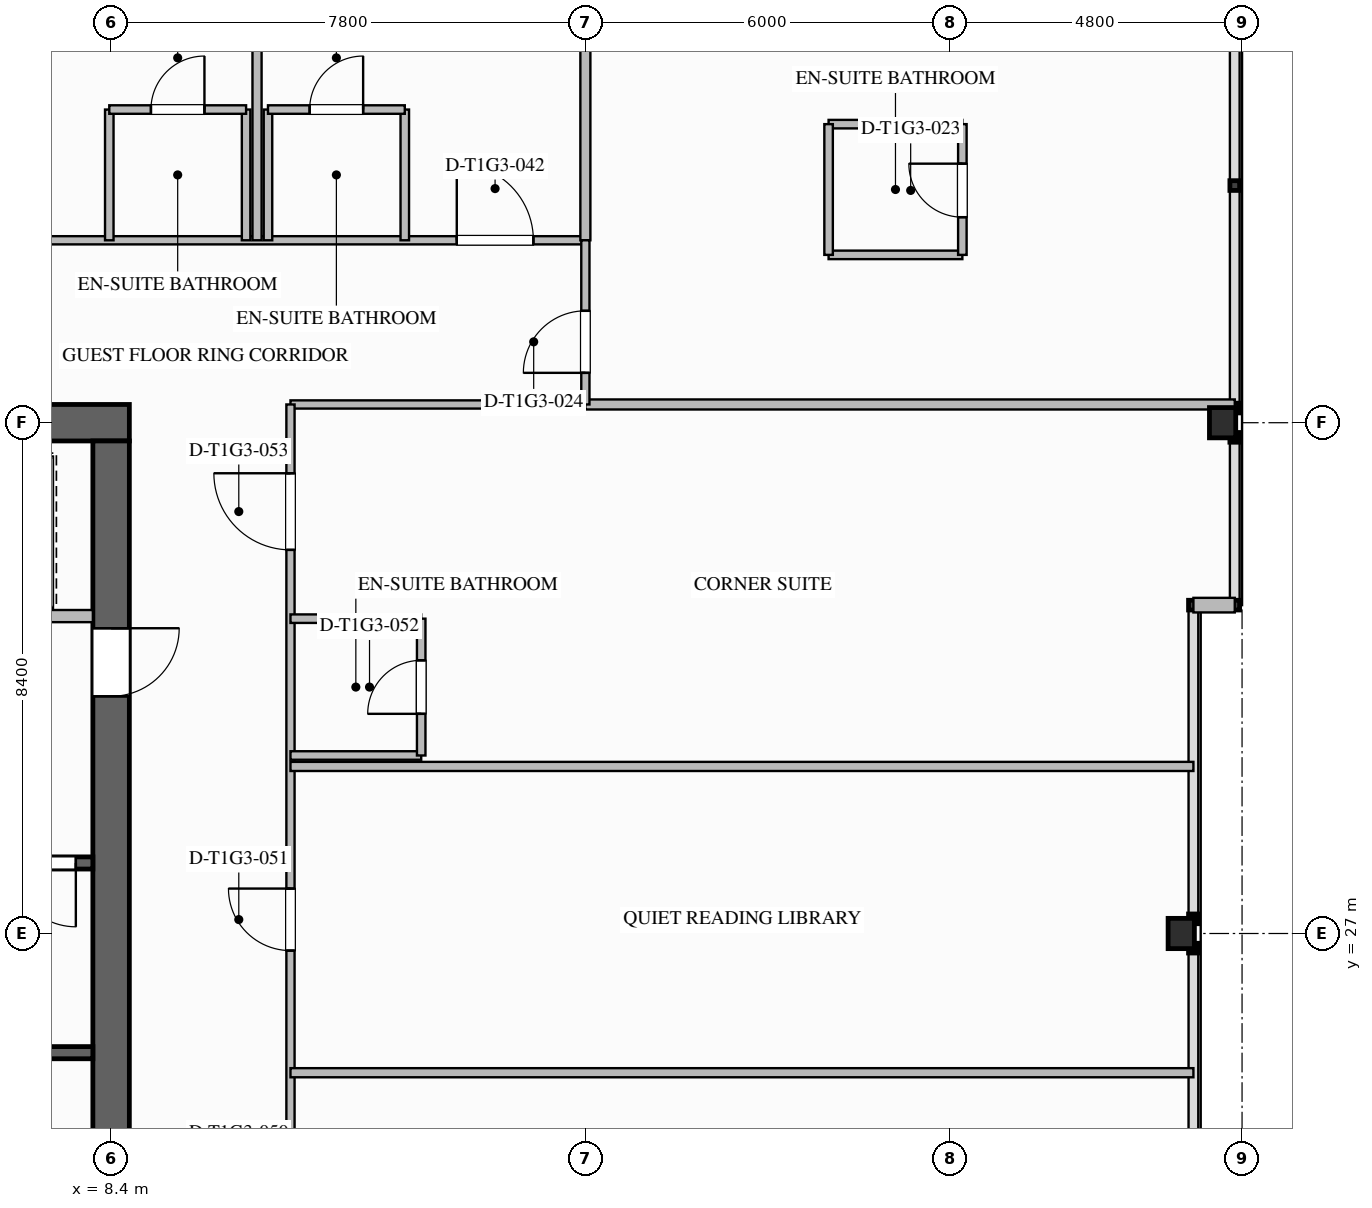
"""IFC4 building model, lengths in metres.
Left out: names, types, materials, properties, quantities, classifications, styles, units other than length and angle.
Written with IfcOpenShell. Run it as: python <this file> out.ifc"""

import sys

from ifc_helpers import new_model, si_unit, direction, frame, frame_2d, origin, origin_2d, place, context, subcontext, project, spatial, rectangle, i_section, extrude, element, fill, save


model = new_model("IFC4")
c1 = context("Model", 3, precision=1e-05, world=origin(), true_north=direction((0.0, 1.0)))
c2 = subcontext(c1, "Body", "Model", "MODEL_VIEW")
j1 = project(units=[si_unit("LENGTHUNIT", "METRE"), si_unit("PLANEANGLEUNIT", "RADIAN")], contexts=[c1])
p1 = place(None, origin())
s1 = spatial("IfcSite", under=j1, at=p1, CompositionType="ELEMENT")
p2 = place(p1, origin())
s2 = spatial("IfcBuilding", under=s1, at=p2, CompositionType="ELEMENT")
p3 = place(p2, frame((0.0, 0.0, 54.2)))
s3 = spatial("IfcBuildingStorey", under=s2, at=p3, CompositionType="ELEMENT", Elevation=54.2)
p4 = place(p3, frame((-8.7, 35.4, 0.0), z_axis=(0.0, 0.0, 1.0), x_axis=(1.0, 0.0, 0.0)))
e1 = element("IfcWall", 1, at=p4, inside=s3, PredefinedType="SHEAR", context=c2, shape_type="SweptSolid", body=[
    extrude(rectangle(XDim=17.4, YDim=0.6, at=frame_2d((8.7, 0.0))), origin(), (0.0, 0.0, 1.0), 3.5),
])
p5 = place(p3, frame((8.4, 35.1, 0.0), z_axis=(0.0, 0.0, 1.0), x_axis=(0.0, -1.0, 0.0)))
e2 = element("IfcWall", 2, at=p5, inside=s3, PredefinedType="SHEAR", context=c2, shape_type="SweptSolid", body=[
    extrude(rectangle(XDim=16.2, YDim=0.6, at=frame_2d((8.1, 0.0))), origin(), (0.0, 0.0, 1.0), 3.5),
])
p6 = place(p5, frame((3.08, 0.0, 0.0)))
e3 = element("IfcOpeningElement", 3, at=p6, cuts=e2, PredefinedType="OPENING", context=c2, shape_type="SweptSolid", body=[
    extrude(rectangle(XDim=1.12, YDim=2.1, at=frame_2d((0.56, 1.05))), frame((0.0, 0.31, 0.0), z_axis=(0.0, -1.0, 0.0), x_axis=(1.0, 0.0, 0.0)), (0.0, 0.0, 1.0), 0.62),
])
for number, where, z_axis, x_axis in (
    (4, (26.0, 27.0, 0.0), (0.0, 0.0, 1.0), (1.0, 0.0, 0.0)),
    (5, (26.68, 35.4, 0.0), (0.0, 0.0, 1.0), (1.0, 0.0, 0.0)),
):
    element("IfcColumn", number, at=place(p3, frame(where, z_axis=z_axis, x_axis=x_axis)), inside=s3, PredefinedType="COLUMN", context=c2, shape_type="SweptSolid", body=[
        extrude(i_section(OverallWidth=0.432, OverallDepth=0.498, WebThickness=0.056, FlangeThickness=0.089, FilletRadius=0.03, at=origin_2d()), origin(), (0.0, 0.0, 1.0), 3.497),
    ])
p7 = place(p3, frame((26.88, 32.4, 0.0), z_axis=(0.0, 0.0, 1.0), x_axis=(-1.0, 0.0, 0.0)))
e6 = element("IfcWall", 6, at=p7, inside=s3, PredefinedType="STANDARD", context=c2, shape_type="SweptSolid", body=[
    extrude(rectangle(XDim=0.68, YDim=0.24, at=frame_2d((0.34, 0.0))), origin(), (0.0, 0.0, 1.0), 3.24),
])
p8 = place(p3, frame((0.0, 25.04, 0.0), z_axis=(0.0, 0.0, 1.0), x_axis=(1.0, 0.0, 0.0)))
e7 = element("IfcWall", 7, at=p8, inside=s3, PredefinedType="SOLIDWALL", context=c2, shape_type="SweptSolid", body=[
    extrude(rectangle(XDim=8.1, YDim=0.2, at=frame_2d((4.05, 0.0))), origin(), (0.0, 0.0, 1.0), 3.24),
])
p9 = place(p3, frame((8.1, 28.16, 0.0), z_axis=(0.0, 0.0, 1.0), x_axis=(-1.0, 0.0, 0.0)))
e8 = element("IfcWall", 8, at=p9, inside=s3, PredefinedType="SOLIDWALL", context=c2, shape_type="SweptSolid", body=[
    extrude(rectangle(XDim=8.1, YDim=0.2, at=frame_2d((4.05, 0.0))), origin(), (0.0, 0.0, 1.0), 3.24),
])
p10 = place(p9, frame((0.28, 0.0, 0.0)))
e9 = element("IfcOpeningElement", 9, at=p10, cuts=e8, PredefinedType="OPENING", context=c2, shape_type="SweptSolid", body=[
    extrude(rectangle(XDim=1.05, YDim=2.1, at=frame_2d((0.525, 1.05))), frame((0.0, 0.11, 0.0), z_axis=(0.0, -1.0, 0.0), x_axis=(1.0, 0.0, 0.0)), (0.0, 0.0, 1.0), 0.22),
])
p11 = place(p3, frame((3.1, 32.22, 0.0), z_axis=(0.0, 0.0, 1.0), x_axis=(1.0, 0.0, 0.0)))
e10 = element("IfcWall", 10, at=p11, inside=s3, PredefinedType="SOLIDWALL", context=c2, shape_type="SweptSolid", body=[
    extrude(rectangle(XDim=5.0, YDim=0.2, at=frame_2d((2.5, 0.0))), origin(), (0.0, 0.0, 1.0), 3.24),
])
p12 = place(p11, frame((0.55, 0.0, 0.0)))
e11 = element("IfcOpeningElement", 11, at=p12, cuts=e10, PredefinedType="OPENING", context=c2, shape_type="SweptSolid", body=[
    extrude(rectangle(XDim=1.2, YDim=2.2, at=frame_2d((0.6, 1.1))), frame((0.0, 0.11, 0.0), z_axis=(0.0, -1.0, 0.0), x_axis=(1.0, 0.0, 0.0)), (0.0, 0.0, 1.0), 0.22),
])
p13 = place(p11, frame((2.85, 0.0, 0.0)))
e12 = element("IfcOpeningElement", 12, at=p13, cuts=e10, PredefinedType="OPENING", context=c2, shape_type="SweptSolid", body=[
    extrude(rectangle(XDim=1.2, YDim=2.2, at=frame_2d((0.6, 1.1))), frame((0.0, 0.11, 0.0), z_axis=(0.0, -1.0, 0.0), x_axis=(1.0, 0.0, 0.0)), (0.0, 0.0, 1.0), 0.22),
])
p14 = place(p3, frame((-16.2, 38.4, 0.0), z_axis=(0.0, 0.0, 1.0), x_axis=(1.0, 0.0, 0.0)))
e13 = element("IfcWall", 13, at=p14, inside=s3, PredefinedType="PARTITIONING", context=c2, shape_type="SweptSolid", body=[
    extrude(rectangle(XDim=32.4, YDim=0.135, at=frame_2d((16.2, 0.0))), origin(), (0.0, 0.0, 1.0), 3.24),
])
p15 = place(p14, frame((4.095, 0.0, 0.0)))
e14 = element("IfcOpeningElement", 14, at=p15, cuts=e13, PredefinedType="OPENING", context=c2, shape_type="SweptSolid", body=[
    extrude(rectangle(XDim=1.26, YDim=2.2, at=frame_2d((0.63, 1.1))), frame((0.0, 0.077, 0.0), z_axis=(0.0, -1.0, 0.0), x_axis=(1.0, 0.0, 0.0)), (0.0, 0.0, 1.0), 0.155),
])
p16 = place(p14, frame((7.875, 0.0, 0.0)))
e15 = element("IfcOpeningElement", 15, at=p16, cuts=e13, PredefinedType="OPENING", context=c2, shape_type="SweptSolid", body=[
    extrude(rectangle(XDim=1.26, YDim=2.2, at=frame_2d((0.63, 1.1))), frame((0.0, 0.077, 0.0), z_axis=(0.0, -1.0, 0.0), x_axis=(1.0, 0.0, 0.0)), (0.0, 0.0, 1.0), 0.155),
])
p17 = place(p14, frame((15.69, 0.0, 0.0)))
e16 = element("IfcOpeningElement", 16, at=p17, cuts=e13, PredefinedType="OPENING", context=c2, shape_type="SweptSolid", body=[
    extrude(rectangle(XDim=1.02, YDim=2.15, at=frame_2d((0.51, 1.075))), frame((0.0, 0.077, 0.0), z_axis=(0.0, -1.0, 0.0), x_axis=(1.0, 0.0, 0.0)), (0.0, 0.0, 1.0), 0.155),
])
p18 = place(p14, frame((21.645, 0.0, 0.0)))
e17 = element("IfcOpeningElement", 17, at=p18, cuts=e13, PredefinedType="OPENING", context=c2, shape_type="SweptSolid", body=[
    extrude(rectangle(XDim=1.26, YDim=2.2, at=frame_2d((0.63, 1.1))), frame((0.0, 0.077, 0.0), z_axis=(0.0, -1.0, 0.0), x_axis=(1.0, 0.0, 0.0)), (0.0, 0.0, 1.0), 0.155),
])
p19 = place(p14, frame((30.285, 0.0, 0.0)))
e18 = element("IfcOpeningElement", 18, at=p19, cuts=e13, PredefinedType="OPENING", context=c2, shape_type="SweptSolid", body=[
    extrude(rectangle(XDim=1.26, YDim=2.2, at=frame_2d((0.63, 1.1))), frame((0.0, 0.077, 0.0), z_axis=(0.0, -1.0, 0.0), x_axis=(1.0, 0.0, 0.0)), (0.0, 0.0, 1.0), 0.155),
])
p20 = place(p3, frame((11.35, 35.7, 0.0), z_axis=(0.0, 0.0, 1.0), x_axis=(1.0, 0.0, 0.0)))
e19 = element("IfcWall", 19, at=p20, inside=s3, PredefinedType="PARTITIONING", context=c2, shape_type="SweptSolid", body=[
    extrude(rectangle(XDim=4.85, YDim=0.135, at=frame_2d((2.425, 0.0))), origin(), (0.0, 0.0, 1.0), 3.24),
])
p21 = place(p3, frame((11.35, 18.3, 0.0), z_axis=(0.0, 0.0, 1.0), x_axis=(0.0, 1.0, 0.0)))
e20 = element("IfcWall", 20, at=p21, inside=s3, PredefinedType="PARTITIONING", context=c2, shape_type="SweptSolid", body=[
    extrude(rectangle(XDim=17.4, YDim=0.135, at=frame_2d((8.7, 0.0))), origin(), (0.0, 0.0, 1.0), 3.24),
])
p22 = place(p21, frame((3.79, 0.0, 0.0)))
e21 = element("IfcOpeningElement", 21, at=p22, cuts=e20, PredefinedType="OPENING", context=c2, shape_type="SweptSolid", body=[
    extrude(rectangle(XDim=1.26, YDim=2.2, at=frame_2d((0.63, 1.1))), frame((0.0, 0.077, 0.0), z_axis=(0.0, -1.0, 0.0), x_axis=(1.0, 0.0, 0.0)), (0.0, 0.0, 1.0), 0.155),
])
p23 = place(p21, frame((8.419, 0.0, 0.0)))
e22 = element("IfcOpeningElement", 22, at=p23, cuts=e20, PredefinedType="OPENING", context=c2, shape_type="SweptSolid", body=[
    extrude(rectangle(XDim=1.02, YDim=2.15, at=frame_2d((0.51, 1.075))), frame((0.0, 0.077, 0.0), z_axis=(0.0, -1.0, 0.0), x_axis=(1.0, 0.0, 0.0)), (0.0, 0.0, 1.0), 0.155),
])
p24 = place(p21, frame((15.009, 0.0, 0.0)))
e23 = element("IfcOpeningElement", 23, at=p24, cuts=e20, PredefinedType="OPENING", context=c2, shape_type="SweptSolid", body=[
    extrude(rectangle(XDim=1.26, YDim=2.2, at=frame_2d((0.63, 1.1))), frame((0.0, 0.077, 0.0), z_axis=(0.0, -1.0, 0.0), x_axis=(1.0, 0.0, 0.0)), (0.0, 0.0, 1.0), 0.155),
])
p25 = place(p3, frame((16.2, 38.4, 0.0), z_axis=(0.0, 0.0, 1.0), x_axis=(0.0, 1.0, 0.0)))
e24 = element("IfcWall", 24, at=p25, inside=s3, PredefinedType="PARTITIONING", context=c2, shape_type="SweptSolid", body=[
    extrude(rectangle(XDim=15.48, YDim=0.165, at=frame_2d((7.74, 0.0))), origin(), (0.0, 0.0, 1.0), 2.298),
])
p26 = place(p3, frame((16.2, 35.7, 0.0), z_axis=(0.0, 0.0, 1.0), x_axis=(1.0, 0.0, 0.0)))
e25 = element("IfcWall", 25, at=p26, inside=s3, PredefinedType="PARTITIONING", context=c2, shape_type="SweptSolid", body=[
    extrude(rectangle(XDim=10.68, YDim=0.165, at=frame_2d((5.34, 0.0))), origin(), (0.0, 0.0, 1.0), 2.298),
])
p27 = place(p3, frame((16.2, 35.7, 0.0), z_axis=(0.0, 0.0, 1.0), x_axis=(0.0, 1.0, 0.0)))
e26 = element("IfcWall", 26, at=p27, inside=s3, PredefinedType="PARTITIONING", context=c2, shape_type="SweptSolid", body=[
    extrude(rectangle(XDim=2.7, YDim=0.135, at=frame_2d((1.35, 0.0))), origin(), (0.0, 0.0, 1.0), 2.298),
])
p28 = place(p27, frame((0.52, 0.0, 0.0)))
e27 = element("IfcOpeningElement", 27, at=p28, cuts=e26, PredefinedType="OPENING", context=c2, shape_type="SweptSolid", body=[
    extrude(rectangle(XDim=1.02, YDim=2.15, at=frame_2d((0.51, 1.075))), frame((0.0, 0.077, 0.0), z_axis=(0.0, -1.0, 0.0), x_axis=(1.0, 0.0, 0.0)), (0.0, 0.0, 1.0), 0.155),
])
for number, where, z_axis, x_axis in (
    (28, (20.2, 38.16, 0.0), (0.0, 0.0, 1.0), (1.0, 0.0, 0.0)),
    (29, (20.2, 40.31, 0.0), (0.0, 0.0, 1.0), (1.0, 0.0, 0.0)),
):
    element("IfcWall", number, at=place(p3, frame(where, z_axis=z_axis, x_axis=x_axis)), inside=s3, PredefinedType="PLUMBINGWALL", context=c2, shape_type="SweptSolid", body=[
        extrude(rectangle(XDim=2.2, YDim=0.14, at=frame_2d((1.1, 0.0))), origin(), (0.0, 0.0, 1.0), 3.24),
    ])
p29 = place(p3, frame((20.2, 38.16, 0.0), z_axis=(0.0, 0.0, 1.0), x_axis=(0.0, 1.0, 0.0)))
e30 = element("IfcWall", 30, at=p29, inside=s3, PredefinedType="PLUMBINGWALL", context=c2, shape_type="SweptSolid", body=[
    extrude(rectangle(XDim=2.15, YDim=0.14, at=frame_2d((1.075, 0.0))), origin(), (0.0, 0.0, 1.0), 3.24),
])
p30 = place(p3, frame((22.4, 38.16, 0.0), z_axis=(0.0, 0.0, 1.0), x_axis=(0.0, 1.0, 0.0)))
e31 = element("IfcWall", 31, at=p30, inside=s3, PredefinedType="PLUMBINGWALL", context=c2, shape_type="SweptSolid", body=[
    extrude(rectangle(XDim=2.15, YDim=0.14, at=frame_2d((1.075, 0.0))), origin(), (0.0, 0.0, 1.0), 3.24),
])
p31 = place(p30, frame((0.62, 0.0, 0.0)))
e32 = element("IfcOpeningElement", 32, at=p31, cuts=e31, PredefinedType="OPENING", context=c2, shape_type="SweptSolid", body=[
    extrude(rectangle(XDim=0.88, YDim=2.1, at=frame_2d((0.44, 1.05))), frame((0.0, 0.08, 0.0), z_axis=(0.0, -1.0, 0.0), x_axis=(1.0, 0.0, 0.0)), (0.0, 0.0, 1.0), 0.16),
])
p32 = place(p3, frame((8.37, 38.4, 0.0), z_axis=(0.0, 0.0, 1.0), x_axis=(0.0, 1.0, 0.0)))
e33 = element("IfcWall", 33, at=p32, inside=s3, PredefinedType="PLUMBINGWALL", context=c2, shape_type="SweptSolid", body=[
    extrude(rectangle(XDim=2.15, YDim=0.14, at=frame_2d((1.075, 0.0))), origin(), (0.0, 0.0, 1.0), 2.617),
])
p33 = place(p3, frame((10.62, 38.4, 0.0), z_axis=(0.0, 0.0, 1.0), x_axis=(0.0, 1.0, 0.0)))
e34 = element("IfcWall", 34, at=p33, inside=s3, PredefinedType="PLUMBINGWALL", context=c2, shape_type="SweptSolid", body=[
    extrude(rectangle(XDim=2.15, YDim=0.14, at=frame_2d((1.075, 0.0))), origin(), (0.0, 0.0, 1.0), 3.24),
])
p34 = place(p3, frame((8.37, 40.55, 0.0), z_axis=(0.0, 0.0, 1.0), x_axis=(1.0, 0.0, 0.0)))
e35 = element("IfcWall", 35, at=p34, inside=s3, PredefinedType="PLUMBINGWALL", context=c2, shape_type="SweptSolid", body=[
    extrude(rectangle(XDim=2.25, YDim=0.14, at=frame_2d((1.125, 0.0))), origin(), (0.0, 0.0, 1.0), 3.24),
])
p35 = place(p34, frame((0.685, 0.0, 0.0)))
e36 = element("IfcOpeningElement", 36, at=p35, cuts=e35, PredefinedType="OPENING", context=c2, shape_type="SweptSolid", body=[
    extrude(rectangle(XDim=0.88, YDim=2.1, at=frame_2d((0.44, 1.05))), frame((0.0, 0.08, 0.0), z_axis=(0.0, -1.0, 0.0), x_axis=(1.0, 0.0, 0.0)), (0.0, 0.0, 1.0), 0.16),
])
p36 = place(p3, frame((10.8, 38.4, 0.0), z_axis=(0.0, 0.0, 1.0), x_axis=(0.0, 1.0, 0.0)))
e37 = element("IfcWall", 37, at=p36, inside=s3, PredefinedType="PARTITIONING", context=c2, shape_type="SweptSolid", body=[
    extrude(rectangle(XDim=15.48, YDim=0.15, at=frame_2d((7.74, 0.0))), origin(), (0.0, 0.0, 1.0), 3.24),
])
for number, where, z_axis, x_axis in (
    (38, (10.98, 38.4, 0.0), (0.0, 0.0, 1.0), (0.0, 1.0, 0.0)),
    (39, (13.23, 38.4, 0.0), (0.0, 0.0, 1.0), (0.0, 1.0, 0.0)),
):
    element("IfcWall", number, at=place(p3, frame(where, z_axis=z_axis, x_axis=x_axis)), inside=s3, PredefinedType="PLUMBINGWALL", context=c2, shape_type="SweptSolid", body=[
        extrude(rectangle(XDim=2.15, YDim=0.14, at=frame_2d((1.075, 0.0))), origin(), (0.0, 0.0, 1.0), 3.24),
    ])
p37 = place(p3, frame((10.98, 40.55, 0.0), z_axis=(0.0, 0.0, 1.0), x_axis=(1.0, 0.0, 0.0)))
e40 = element("IfcWall", 40, at=p37, inside=s3, PredefinedType="PLUMBINGWALL", context=c2, shape_type="SweptSolid", body=[
    extrude(rectangle(XDim=2.25, YDim=0.14, at=frame_2d((1.125, 0.0))), origin(), (0.0, 0.0, 1.0), 3.24),
])
p38 = place(p37, frame((0.685, 0.0, 0.0)))
e41 = element("IfcOpeningElement", 41, at=p38, cuts=e40, PredefinedType="OPENING", context=c2, shape_type="SweptSolid", body=[
    extrude(rectangle(XDim=0.88, YDim=2.1, at=frame_2d((0.44, 1.05))), frame((0.0, 0.08, 0.0), z_axis=(0.0, -1.0, 0.0), x_axis=(1.0, 0.0, 0.0)), (0.0, 0.0, 1.0), 0.16),
])
for number, where, z_axis, x_axis in (
    (42, (11.35, 24.71, 0.0), (0.0, 0.0, 1.0), (1.0, 0.0, 0.0)),
    (43, (11.35, 29.747, 0.0), (0.0, 0.0, 1.0), (1.0, 0.0, 0.0)),
):
    element("IfcWall", number, at=place(p3, frame(where, z_axis=z_axis, x_axis=x_axis)), inside=s3, PredefinedType="PARTITIONING", context=c2, shape_type="SweptSolid", body=[
        extrude(rectangle(XDim=14.85, YDim=0.15, at=frame_2d((7.425, 0.0))), origin(), (0.0, 0.0, 1.0), 3.24),
    ])
for number, where, z_axis, x_axis in (
    (44, (11.35, 29.927, 0.0), (0.0, 0.0, 1.0), (1.0, 0.0, 0.0)),
    (45, (11.35, 32.177, 0.0), (0.0, 0.0, 1.0), (1.0, 0.0, 0.0)),
):
    element("IfcWall", number, at=place(p3, frame(where, z_axis=z_axis, x_axis=x_axis)), inside=s3, PredefinedType="PLUMBINGWALL", context=c2, shape_type="SweptSolid", body=[
        extrude(rectangle(XDim=2.15, YDim=0.14, at=frame_2d((1.075, 0.0))), origin(), (0.0, 0.0, 1.0), 3.24),
    ])
p39 = place(p3, frame((13.5, 29.927, 0.0), z_axis=(0.0, 0.0, 1.0), x_axis=(0.0, 1.0, 0.0)))
e46 = element("IfcWall", 46, at=p39, inside=s3, PredefinedType="PLUMBINGWALL", context=c2, shape_type="SweptSolid", body=[
    extrude(rectangle(XDim=2.25, YDim=0.14, at=frame_2d((1.125, 0.0))), origin(), (0.0, 0.0, 1.0), 3.24),
])
p40 = place(p39, frame((0.685, 0.0, 0.0)))
e47 = element("IfcOpeningElement", 47, at=p40, cuts=e46, PredefinedType="OPENING", context=c2, shape_type="SweptSolid", body=[
    extrude(rectangle(XDim=0.88, YDim=2.1, at=frame_2d((0.44, 1.05))), frame((0.0, 0.08, 0.0), z_axis=(0.0, -1.0, 0.0), x_axis=(1.0, 0.0, 0.0)), (0.0, 0.0, 1.0), 0.16),
])
p41 = place(p10, origin())
e48 = element("IfcDoor", 48, at=p41, inside=s3, OperationType="SINGLE_SWING_LEFT", PredefinedType="DOOR", context=c2, shape_type="SweptSolid", body=[
    extrude(rectangle(XDim=1.05, YDim=2.1, at=frame_2d((0.525, 1.05))), frame((0.0, 0.025, 0.0), z_axis=(0.0, -1.0, 0.0), x_axis=(1.0, 0.0, 0.0)), (0.0, 0.0, 1.0), 0.05),
])
fill(e9, e48)
p42 = place(p6, origin())
e49 = element("IfcDoor", 49, at=p42, inside=s3, OperationType="SINGLE_SWING_LEFT", PredefinedType="DOOR", context=c2, shape_type="SweptSolid", body=[
    extrude(rectangle(XDim=1.12, YDim=2.1, at=frame_2d((0.56, 1.05))), frame((0.0, 0.025, 0.0), z_axis=(0.0, -1.0, 0.0), x_axis=(1.0, 0.0, 0.0)), (0.0, 0.0, 1.0), 0.05),
])
fill(e3, e49)
p43 = place(p31, origin())
e50 = element("IfcDoor", 50, at=p43, inside=s3, OperationType="SINGLE_SWING_RIGHT", PredefinedType="DOOR", context=c2, shape_type="SweptSolid", body=[
    extrude(rectangle(XDim=0.88, YDim=2.1, at=frame_2d((0.44, 1.05))), frame((0.0, 0.025, 0.0), z_axis=(0.0, -1.0, 0.0), x_axis=(1.0, 0.0, 0.0)), (0.0, 0.0, 1.0), 0.05),
])
fill(e32, e50)
p44 = place(p28, origin())
e51 = element("IfcDoor", 51, at=p44, inside=s3, OperationType="SINGLE_SWING_LEFT", PredefinedType="DOOR", context=c2, shape_type="SweptSolid", body=[
    extrude(rectangle(XDim=1.02, YDim=2.15, at=frame_2d((0.51, 1.075))), frame((0.0, 0.025, 0.0), z_axis=(0.0, -1.0, 0.0), x_axis=(1.0, 0.0, 0.0)), (0.0, 0.0, 1.0), 0.05),
])
fill(e27, e51)
p45 = place(p35, origin())
e52 = element("IfcDoor", 52, at=p45, inside=s3, OperationType="SINGLE_SWING_RIGHT", PredefinedType="DOOR", context=c2, shape_type="SweptSolid", body=[
    extrude(rectangle(XDim=0.88, YDim=2.1, at=frame_2d((0.44, 1.05))), frame((0.0, 0.025, 0.0), z_axis=(0.0, -1.0, 0.0), x_axis=(1.0, 0.0, 0.0)), (0.0, 0.0, 1.0), 0.05),
])
fill(e36, e52)
p46 = place(p38, origin())
e53 = element("IfcDoor", 53, at=p46, inside=s3, OperationType="SINGLE_SWING_RIGHT", PredefinedType="DOOR", context=c2, shape_type="SweptSolid", body=[
    extrude(rectangle(XDim=0.88, YDim=2.1, at=frame_2d((0.44, 1.05))), frame((0.0, 0.025, 0.0), z_axis=(0.0, -1.0, 0.0), x_axis=(1.0, 0.0, 0.0)), (0.0, 0.0, 1.0), 0.05),
])
fill(e41, e53)
p47 = place(p19, origin())
e54 = element("IfcDoor", 54, at=p47, inside=s3, OperationType="SINGLE_SWING_LEFT", PredefinedType="DOOR", context=c2, shape_type="SweptSolid", body=[
    extrude(rectangle(XDim=1.26, YDim=2.2, at=frame_2d((0.63, 1.1))), frame((0.0, 0.025, 0.0), z_axis=(0.0, -1.0, 0.0), x_axis=(1.0, 0.0, 0.0)), (0.0, 0.0, 1.0), 0.05),
])
fill(e18, e54)
p48 = place(p23, origin())
e55 = element("IfcDoor", 55, at=p48, inside=s3, OperationType="SINGLE_SWING_RIGHT", PredefinedType="DOOR", context=c2, shape_type="SweptSolid", body=[
    extrude(rectangle(XDim=1.02, YDim=2.15, at=frame_2d((0.51, 1.075))), frame((0.0, 0.025, 0.0), z_axis=(0.0, -1.0, 0.0), x_axis=(1.0, 0.0, 0.0)), (0.0, 0.0, 1.0), 0.05),
])
fill(e22, e55)
p49 = place(p40, origin())
e56 = element("IfcDoor", 56, at=p49, inside=s3, OperationType="SINGLE_SWING_LEFT", PredefinedType="DOOR", context=c2, shape_type="SweptSolid", body=[
    extrude(rectangle(XDim=0.88, YDim=2.1, at=frame_2d((0.44, 1.05))), frame((0.0, 0.025, 0.0), z_axis=(0.0, -1.0, 0.0), x_axis=(1.0, 0.0, 0.0)), (0.0, 0.0, 1.0), 0.05),
])
fill(e47, e56)
p50 = place(p24, origin())
e57 = element("IfcDoor", 57, at=p50, inside=s3, OperationType="SINGLE_SWING_RIGHT", PredefinedType="DOOR", context=c2, shape_type="SweptSolid", body=[
    extrude(rectangle(XDim=1.26, YDim=2.2, at=frame_2d((0.63, 1.1))), frame((0.0, 0.025, 0.0), z_axis=(0.0, -1.0, 0.0), x_axis=(1.0, 0.0, 0.0)), (0.0, 0.0, 1.0), 0.05),
])
fill(e23, e57)
save(model, sys.argv[1])
